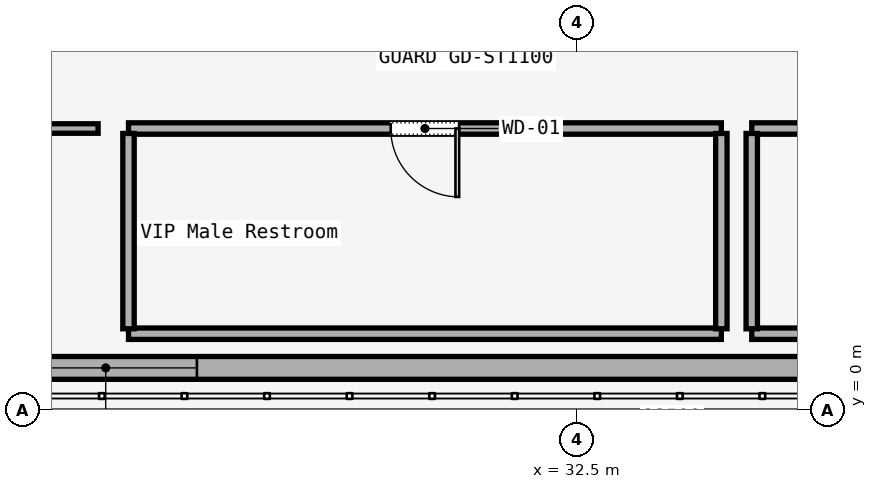
"""IFC4 building model, lengths in metres.
Left out: names, types, materials, properties, quantities, classifications, styles, units other than length and angle.
Written with IfcOpenShell. Run it as: python <this file> out.ifc"""

import sys

from ifc_helpers import new_model, si_unit, direction, frame, frame_2d, origin, place, context, subcontext, project, spatial, rectangle, extrude, element, fill, save


model = new_model("IFC4")
c1 = context("Model", 3, precision=1e-05, world=origin(), true_north=direction((0.0, 1.0)))
c2 = subcontext(c1, "Body", "Model", "MODEL_VIEW")
j1 = project(units=[si_unit("LENGTHUNIT", "METRE"), si_unit("PLANEANGLEUNIT", "RADIAN")], contexts=[c1])
p1 = place(None, origin())
s1 = spatial("IfcSite", under=j1, at=p1, CompositionType="ELEMENT")
p2 = place(p1, origin())
s2 = spatial("IfcBuilding", under=s1, at=p2, CompositionType="ELEMENT")
p3 = place(p2, frame((0.0, 0.0, 12.0)))
s3 = spatial("IfcBuildingStorey", under=s2, at=p3, CompositionType="ELEMENT", Elevation=12.0)
p4 = place(p3, frame((2.3, 0.55, 0.0), z_axis=(0.0, 0.0, 1.0), x_axis=(1.0, 0.0, 0.0)))
e1 = element("IfcWall", 1, at=p4, inside=s3, PredefinedType="SOLIDWALL", context=c2, shape_type="SweptSolid", body=[
    extrude(rectangle(XDim=79.4, YDim=0.3, at=frame_2d((39.7, 0.0))), origin(), (0.0, 0.0, 1.0), 5.7),
])
p5 = place(p4, frame((5.8, 0.0, 1.0)))
e2 = element("IfcOpeningElement", 2, at=p5, cuts=e1, PredefinedType="OPENING", context=c2, shape_type="SweptSolid", body=[
    extrude(rectangle(XDim=2.4, YDim=2.2, at=frame_2d((1.2, 1.1))), frame((0.0, 0.15, 0.0), z_axis=(0.0, -1.0, 0.0), x_axis=(1.0, 0.0, 0.0)), (0.0, 0.0, 1.0), 0.3),
])
p6 = place(p4, frame((12.6, 0.0, 1.0)))
e3 = element("IfcOpeningElement", 3, at=p6, cuts=e1, PredefinedType="OPENING", context=c2, shape_type="SweptSolid", body=[
    extrude(rectangle(XDim=2.4, YDim=2.2, at=frame_2d((1.2, 1.1))), frame((0.0, 0.15, 0.0), z_axis=(0.0, -1.0, 0.0), x_axis=(1.0, 0.0, 0.0)), (0.0, 0.0, 1.0), 0.3),
])
p7 = place(p4, frame((22.8, 0.0, 1.0)))
e4 = element("IfcOpeningElement", 4, at=p7, cuts=e1, PredefinedType="OPENING", context=c2, shape_type="SweptSolid", body=[
    extrude(rectangle(XDim=2.4, YDim=2.2, at=frame_2d((1.2, 1.1))), frame((0.0, 0.15, 0.0), z_axis=(0.0, -1.0, 0.0), x_axis=(1.0, 0.0, 0.0)), (0.0, 0.0, 1.0), 0.3),
])
p8 = place(p4, frame((33.2, 0.0, 1.0)))
e5 = element("IfcOpeningElement", 5, at=p8, cuts=e1, PredefinedType="OPENING", context=c2, shape_type="SweptSolid", body=[
    extrude(rectangle(XDim=2.4, YDim=2.2, at=frame_2d((1.2, 1.1))), frame((0.0, 0.15, 0.0), z_axis=(0.0, -1.0, 0.0), x_axis=(1.0, 0.0, 0.0)), (0.0, 0.0, 1.0), 0.3),
])
p9 = place(p4, frame((44.8, 0.0, 1.0)))
e6 = element("IfcOpeningElement", 6, at=p9, cuts=e1, PredefinedType="OPENING", context=c2, shape_type="SweptSolid", body=[
    extrude(rectangle(XDim=2.4, YDim=2.2, at=frame_2d((1.2, 1.1))), frame((0.0, 0.15, 0.0), z_axis=(0.0, -1.0, 0.0), x_axis=(1.0, 0.0, 0.0)), (0.0, 0.0, 1.0), 0.3),
])
p10 = place(p4, frame((55.2, 0.0, 1.0)))
e7 = element("IfcOpeningElement", 7, at=p10, cuts=e1, PredefinedType="OPENING", context=c2, shape_type="SweptSolid", body=[
    extrude(rectangle(XDim=2.4, YDim=2.2, at=frame_2d((1.2, 1.1))), frame((0.0, 0.15, 0.0), z_axis=(0.0, -1.0, 0.0), x_axis=(1.0, 0.0, 0.0)), (0.0, 0.0, 1.0), 0.3),
])
p11 = place(p4, frame((66.4, 0.0, 1.0)))
e8 = element("IfcOpeningElement", 8, at=p11, cuts=e1, PredefinedType="OPENING", context=c2, shape_type="SweptSolid", body=[
    extrude(rectangle(XDim=2.4, YDim=2.2, at=frame_2d((1.2, 1.1))), frame((0.0, 0.15, 0.0), z_axis=(0.0, -1.0, 0.0), x_axis=(1.0, 0.0, 0.0)), (0.0, 0.0, 1.0), 0.3),
])
p12 = place(p4, frame((73.0, 0.0, 1.0)))
e9 = element("IfcOpeningElement", 9, at=p12, cuts=e1, PredefinedType="OPENING", context=c2, shape_type="SweptSolid", body=[
    extrude(rectangle(XDim=2.4, YDim=2.2, at=frame_2d((1.2, 1.1))), frame((0.0, 0.15, 0.0), z_axis=(0.0, -1.0, 0.0), x_axis=(1.0, 0.0, 0.0)), (0.0, 0.0, 1.0), 0.3),
])
p13 = place(p3, frame((42.6, 3.7, 0.0), z_axis=(0.0, 0.0, 1.0), x_axis=(-1.0, 0.0, 0.0)))
e10 = element("IfcWall", 10, at=p13, inside=s3, PredefinedType="PARTITIONING", context=c2, shape_type="SweptSolid", body=[
    extrude(rectangle(XDim=7.8, YDim=0.15, at=frame_2d((3.9, 0.0))), origin(), (0.0, 0.0, 1.0), 4.819),
])
p14 = place(p13, frame((3.45, 0.0, 0.0)))
e11 = element("IfcOpeningElement", 11, at=p14, cuts=e10, PredefinedType="OPENING", context=c2, shape_type="SweptSolid", body=[
    extrude(rectangle(XDim=0.9, YDim=2.15, at=frame_2d((0.45, 1.075))), frame((0.0, 0.075, 0.0), z_axis=(0.0, -1.0, 0.0), x_axis=(1.0, 0.0, 0.0)), (0.0, 0.0, 1.0), 0.15),
])
p15 = place(p3, frame((34.4, 3.7, 0.0), z_axis=(0.0, 0.0, 1.0), x_axis=(-1.0, 0.0, 0.0)))
e12 = element("IfcWall", 12, at=p15, inside=s3, PredefinedType="PARTITIONING", context=c2, shape_type="SweptSolid", body=[
    extrude(rectangle(XDim=7.8, YDim=0.15, at=frame_2d((3.9, 0.0))), origin(), (0.0, 0.0, 1.0), 4.819),
])
p16 = place(p15, frame((3.45, 0.0, 0.0)))
e13 = element("IfcOpeningElement", 13, at=p16, cuts=e12, PredefinedType="OPENING", context=c2, shape_type="SweptSolid", body=[
    extrude(rectangle(XDim=0.9, YDim=2.15, at=frame_2d((0.45, 1.075))), frame((0.0, 0.075, 0.0), z_axis=(0.0, -1.0, 0.0), x_axis=(1.0, 0.0, 0.0)), (0.0, 0.0, 1.0), 0.15),
])
p17 = place(p3, frame((26.2, 3.7, 0.0), z_axis=(0.0, 0.0, 1.0), x_axis=(-1.0, 0.0, 0.0)))
e14 = element("IfcWall", 14, at=p17, inside=s3, PredefinedType="PARTITIONING", context=c2, shape_type="SweptSolid", body=[
    extrude(rectangle(XDim=2.2, YDim=0.125, at=frame_2d((1.1, 0.0))), origin(), (0.0, 0.0, 1.0), 4.819),
])
p18 = place(p3, frame((34.4, 1.0, 0.0), z_axis=(0.0, 0.0, 1.0), x_axis=(-1.0, 0.0, 0.0)))
e15 = element("IfcWall", 15, at=p18, inside=s3, PredefinedType="PARTITIONING", context=c2, shape_type="SweptSolid", body=[
    extrude(rectangle(XDim=7.8, YDim=0.15, at=frame_2d((3.9, 0.0))), origin(), (0.0, 0.0, 1.0), 4.819),
])
for number, where, z_axis, x_axis in (
    (16, (26.6, 1.065, 0.0), (0.0, 0.0, 1.0), (0.0, 1.0, 0.0)),
    (17, (34.4, 3.635, 0.0), (0.0, 0.0, 1.0), (0.0, -1.0, 0.0)),
):
    element("IfcWall", number, at=place(p3, frame(where, z_axis=z_axis, x_axis=x_axis)), inside=s3, PredefinedType="PARTITIONING", context=c2, shape_type="SweptSolid", body=[
        extrude(rectangle(XDim=2.57, YDim=0.15, at=frame_2d((1.285, 0.0))), origin(), (0.0, 0.0, 1.0), 4.819),
    ])
p19 = place(p3, frame((42.6, 1.0, 0.0), z_axis=(0.0, 0.0, 1.0), x_axis=(-1.0, 0.0, 0.0)))
e18 = element("IfcWall", 18, at=p19, inside=s3, PredefinedType="PARTITIONING", context=c2, shape_type="SweptSolid", body=[
    extrude(rectangle(XDim=7.8, YDim=0.15, at=frame_2d((3.9, 0.0))), origin(), (0.0, 0.0, 1.0), 4.819),
])
p20 = place(p3, frame((34.8, 1.065, 0.0), z_axis=(0.0, 0.0, 1.0), x_axis=(0.0, 1.0, 0.0)))
e19 = element("IfcWall", 19, at=p20, inside=s3, PredefinedType="PARTITIONING", context=c2, shape_type="SweptSolid", body=[
    extrude(rectangle(XDim=2.57, YDim=0.15, at=frame_2d((1.285, 0.0))), origin(), (0.0, 0.0, 1.0), 4.819),
])
p21 = place(p7, origin())
e20 = element("IfcWindow", 20, at=p21, inside=s3, PartitioningType="SINGLE_PANEL", PredefinedType="WINDOW", context=c2, shape_type="SweptSolid", body=[
    extrude(rectangle(XDim=2.4, YDim=2.2, at=frame_2d((1.2, 1.1))), frame((0.0, 0.03, 0.0), z_axis=(0.0, -1.0, 0.0), x_axis=(1.0, 0.0, 0.0)), (0.0, 0.0, 1.0), 0.06),
])
fill(e4, e20)
p22 = place(p16, origin())
e21 = element("IfcDoor", 21, at=p22, inside=s3, OperationType="SINGLE_SWING_RIGHT", PredefinedType="DOOR", context=c2, shape_type="SweptSolid", body=[
    extrude(rectangle(XDim=0.9, YDim=2.15, at=frame_2d((0.45, 1.075))), frame((0.0, 0.025, 0.0), z_axis=(0.0, -1.0, 0.0), x_axis=(1.0, 0.0, 0.0)), (0.0, 0.0, 1.0), 0.05),
])
fill(e13, e21)
save(model, sys.argv[1])
